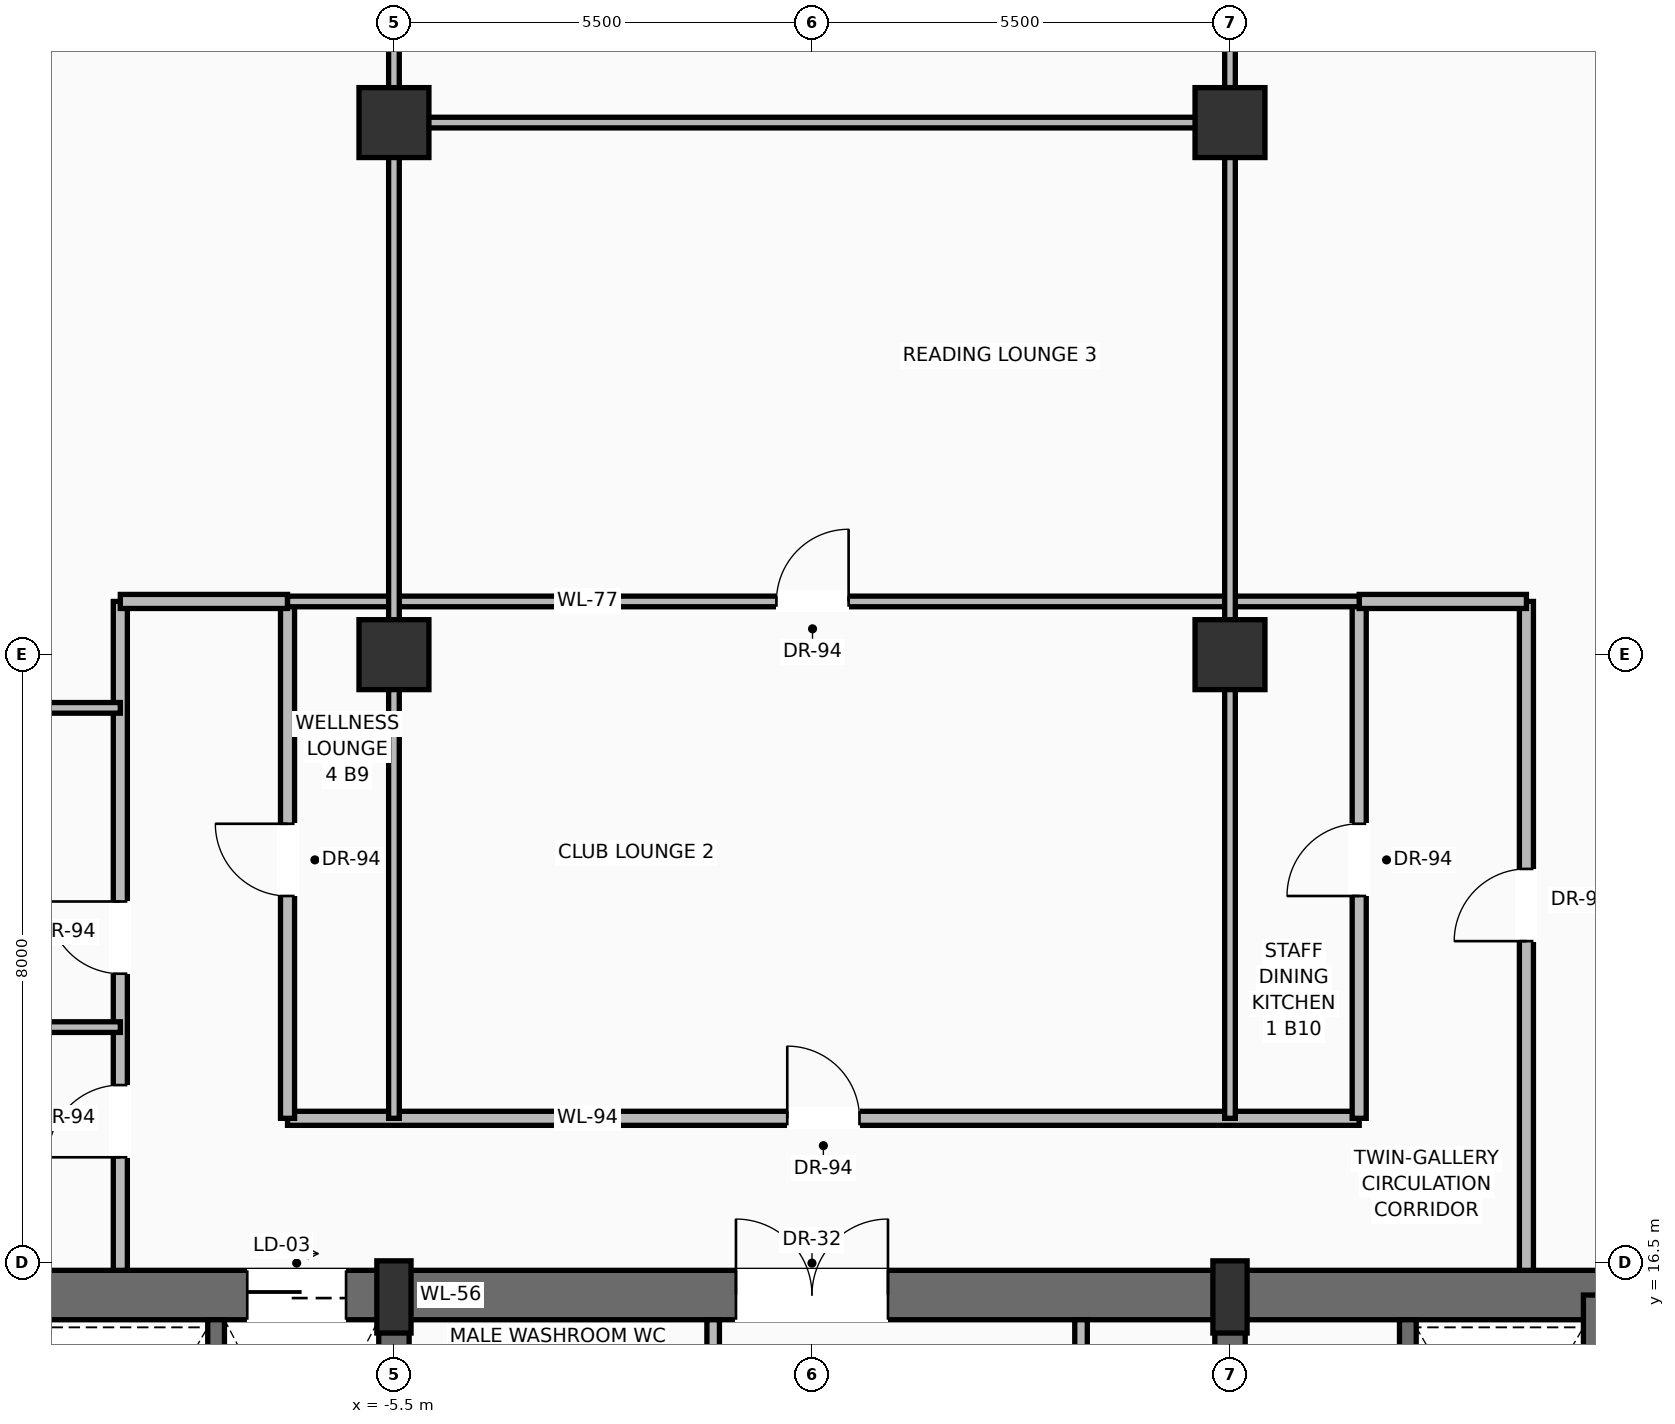
"""IFC4 building model, lengths in metres.
Left out: names, types, materials, properties, quantities, classifications, styles, units other than length and angle.
Written with IfcOpenShell. Run it as: python <this file> out.ifc"""

import sys

from ifc_helpers import new_model, si_unit, direction, frame, frame_2d, origin, origin_2d, place, context, subcontext, project, spatial, rectangle, extrude, source, transform, mapped, element, fill, save


model = new_model("IFC4")
c1 = context("Model", 3, precision=1e-05, world=origin(), true_north=direction((0.0, 1.0)))
c2 = subcontext(c1, "Body", "Model", "MODEL_VIEW")
j1 = project(units=[si_unit("LENGTHUNIT", "METRE"), si_unit("PLANEANGLEUNIT", "RADIAN")], contexts=[c1])
p1 = place(None, origin())
s1 = spatial("IfcSite", under=j1, at=p1, CompositionType="ELEMENT")
p2 = place(p1, origin())
s2 = spatial("IfcBuilding", under=s1, at=p2, CompositionType="ELEMENT")
p3 = place(p2, frame((0.0, 0.0, 147.8)))
s3 = spatial("IfcBuildingStorey", under=s2, at=p3, CompositionType="ELEMENT", Elevation=147.8)
p4 = place(p3, frame((-10.8, 16.075, 0.0), z_axis=(0.0, 0.0, 1.0), x_axis=(1.0, 0.0, 0.0)))
e1 = element("IfcWall", 1, at=p4, inside=s3, PredefinedType="SHEAR", context=c2, shape_type="SweptSolid", body=[
    extrude(rectangle(XDim=21.6, YDim=0.65, at=frame_2d((10.8, 0.0))), origin(), (0.0, 0.0, 1.0), 3.47),
])
p5 = place(p4, frame((3.37, 0.0, 0.0)))
e2 = element("IfcOpeningElement", 2, at=p5, cuts=e1, PredefinedType="OPENING", context=c2, shape_type="SweptSolid", body=[
    extrude(rectangle(XDim=1.3, YDim=2.3, at=frame_2d((0.65, 1.15))), frame((0.0, 0.335, 0.0), z_axis=(0.0, -1.0, 0.0), x_axis=(1.0, 0.0, 0.0)), (0.0, 0.0, 1.0), 0.67),
])
p6 = place(p4, frame((9.8, 0.0, 0.0)))
e3 = element("IfcOpeningElement", 3, at=p6, cuts=e1, PredefinedType="OPENING", context=c2, shape_type="SweptSolid", body=[
    extrude(rectangle(XDim=2.0, YDim=2.4, at=frame_2d((1.0, 1.2))), frame((0.0, 0.335, 0.0), z_axis=(0.0, -1.0, 0.0), x_axis=(1.0, 0.0, 0.0)), (0.0, 0.0, 1.0), 0.67),
])
p7 = place(p3, frame((10.475, 0.525, 0.0), z_axis=(0.0, 0.0, 1.0), x_axis=(0.0, 1.0, 0.0)))
e4 = element("IfcWall", 4, at=p7, inside=s3, PredefinedType="SHEAR", context=c2, shape_type="SweptSolid", body=[
    extrude(rectangle(XDim=15.55, YDim=0.65, at=frame_2d((7.775, 0.0))), origin(), (0.0, 0.0, 1.0), 3.47),
])
p8 = place(p3, frame((-5.5, 0.525, 0.0), z_axis=(0.0, 0.0, 1.0), x_axis=(0.0, 1.0, 0.0)))
e5 = element("IfcWall", 5, at=p8, inside=s3, PredefinedType="SHEAR", context=c2, shape_type="SweptSolid", body=[
    extrude(rectangle(XDim=15.55, YDim=0.4, at=frame_2d((7.775, 0.0))), origin(), (0.0, 0.0, 1.0), 3.47),
])
p9 = place(p8, frame((8.975, 0.0, 0.0)))
e6 = element("IfcOpeningElement", 6, at=p9, cuts=e5, PredefinedType="OPENING", context=c2, shape_type="SweptSolid", body=[
    extrude(rectangle(XDim=1.1, YDim=2.2, at=frame_2d((0.55, 1.1))), frame((0.0, 0.21, 0.0), z_axis=(0.0, -1.0, 0.0), x_axis=(1.0, 0.0, 0.0)), (0.0, 0.0, 1.0), 0.42),
])
p10 = place(p3, frame((5.5, 0.525, 0.0), z_axis=(0.0, 0.0, 1.0), x_axis=(0.0, 1.0, 0.0)))
e7 = element("IfcWall", 7, at=p10, inside=s3, PredefinedType="SHEAR", context=c2, shape_type="SweptSolid", body=[
    extrude(rectangle(XDim=15.55, YDim=0.4, at=frame_2d((7.775, 0.0))), origin(), (0.0, 0.0, 1.0), 3.47),
])
p11 = place(p10, frame((8.975, 0.0, 0.0)))
e8 = element("IfcOpeningElement", 8, at=p11, cuts=e7, PredefinedType="OPENING", context=c2, shape_type="SweptSolid", body=[
    extrude(rectangle(XDim=1.1, YDim=2.2, at=frame_2d((0.55, 1.1))), frame((0.0, 0.21, 0.0), z_axis=(0.0, -1.0, 0.0), x_axis=(1.0, 0.0, 0.0)), (0.0, 0.0, 1.0), 0.42),
])
m1 = source(origin(), c2, "Body", "SweptSolid", [
    extrude(rectangle(XDim=0.45, YDim=0.95, at=origin_2d()), origin(), (0.0, 0.0, 1.0), 3.7),
])
for number, where, z_axis, x_axis in (
    (9, (-5.5, 16.05, 0.0), (0.0, 0.0, 1.0), (1.0, 0.0, 0.0)),
    (10, (5.5, 16.05, 0.0), (0.0, 0.0, 1.0), (1.0, 0.0, 0.0)),
):
    element("IfcColumn", number, at=place(p3, frame(where, z_axis=z_axis, x_axis=x_axis)), inside=s3, PredefinedType="PILASTER", context=c2, shape_type="MappedRepresentation", body=[
        mapped(m1, transform((0.0, 0.0, 0.0), scale=1.0)),
    ])
m2 = source(origin(), c2, "Body", "SweptSolid", [
    extrude(rectangle(XDim=0.92, YDim=0.92, at=origin_2d()), origin(), (0.0, 0.0, 1.0), 3.7),
])
for number, where, z_axis, x_axis in (
    (11, (-5.5, 24.5, 0.0), (0.0, 0.0, 1.0), (1.0, 0.0, 0.0)),
    (12, (5.5, 24.5, 0.0), (0.0, 0.0, 1.0), (1.0, 0.0, 0.0)),
    (13, (-5.5, 31.5, 0.0), (0.0, 0.0, 1.0), (1.0, 0.0, 0.0)),
    (14, (5.5, 31.5, 0.0), (0.0, 0.0, 1.0), (1.0, 0.0, 0.0)),
):
    element("IfcColumn", number, at=place(p3, frame(where, z_axis=z_axis, x_axis=x_axis)), inside=s3, PredefinedType="COLUMN", context=c2, shape_type="MappedRepresentation", body=[
        mapped(m2, transform((0.0, 0.0, 0.0), scale=1.0)),
    ])
for number, where, z_axis, x_axis in (
    (15, (-7.84, 11.87, 0.0), (0.0, 0.0, 1.0), (0.0, 1.0, 0.0)),
    (16, (7.84, 11.87, 0.0), (0.0, 0.0, 1.0), (0.0, 1.0, 0.0)),
):
    element("IfcWall", number, at=place(p3, frame(where, z_axis=z_axis, x_axis=x_axis)), inside=s3, PredefinedType="SOLIDWALL", context=c2, shape_type="SweptSolid", body=[
        extrude(rectangle(XDim=3.88, YDim=0.22, at=frame_2d((1.94, 0.0))), origin(), (0.0, 0.0, 1.0), 3.47),
    ])
p12 = place(p3, frame((-1.3, 13.6, 0.0), z_axis=(0.0, 0.0, 1.0), x_axis=(0.0, 1.0, 0.0)))
e17 = element("IfcWall", 17, at=p12, inside=s3, PredefinedType="PARTITIONING", context=c2, shape_type="SweptSolid", body=[
    extrude(rectangle(XDim=2.15, YDim=0.165, at=frame_2d((1.075, 0.0))), origin(), (0.0, 0.0, 1.0), 3.462),
])
p13 = place(p12, frame((0.55, 0.0, 0.0)))
e18 = element("IfcOpeningElement", 18, at=p13, cuts=e17, PredefinedType="OPENING", context=c2, shape_type="SweptSolid", body=[
    extrude(rectangle(XDim=0.9, YDim=2.1, at=frame_2d((0.45, 1.05))), frame((0.0, 0.093, 0.0), z_axis=(0.0, -1.0, 0.0), x_axis=(1.0, 0.0, 0.0)), (0.0, 0.0, 1.0), 0.185),
])
p14 = place(p3, frame((3.54, 11.22, 0.0), z_axis=(0.0, 0.0, 1.0), x_axis=(0.0, 1.0, 0.0)))
e19 = element("IfcWall", 19, at=p14, inside=s3, PredefinedType="PARTITIONING", context=c2, shape_type="SweptSolid", body=[
    extrude(rectangle(XDim=4.53, YDim=0.165, at=frame_2d((2.265, 0.0))), origin(), (0.0, 0.0, 1.0), 3.462),
])
p15 = place(p14, frame((1.25, 0.0, 0.0)))
e20 = element("IfcOpeningElement", 20, at=p15, cuts=e19, PredefinedType="OPENING", context=c2, shape_type="SweptSolid", body=[
    extrude(rectangle(XDim=0.9, YDim=2.1, at=frame_2d((0.45, 1.05))), frame((0.0, 0.093, 0.0), z_axis=(0.0, -1.0, 0.0), x_axis=(1.0, 0.0, 0.0)), (0.0, 0.0, 1.0), 0.185),
])
p16 = place(p3, frame((-6.9, 18.4, 0.0), z_axis=(0.0, 0.0, 1.0), x_axis=(1.0, 0.0, 0.0)))
e21 = element("IfcWall", 21, at=p16, inside=s3, PredefinedType="PARTITIONING", context=c2, shape_type="SweptSolid", body=[
    extrude(rectangle(XDim=14.1, YDim=0.185, at=frame_2d((7.05, 0.0))), origin(), (0.0, 0.0, 1.0), 2.846),
])
p17 = place(p16, frame((6.575, 0.0, 0.0)))
e22 = element("IfcOpeningElement", 22, at=p17, cuts=e21, PredefinedType="OPENING", context=c2, shape_type="SweptSolid", body=[
    extrude(rectangle(XDim=0.95, YDim=2.2, at=frame_2d((0.475, 1.1))), frame((0.0, 0.103, 0.0), z_axis=(0.0, -1.0, 0.0), x_axis=(1.0, 0.0, 0.0)), (0.0, 0.0, 1.0), 0.205),
])
p18 = place(p3, frame((-6.9, 18.4, 0.0), z_axis=(0.0, 0.0, 1.0), x_axis=(0.0, 1.0, 0.0)))
e23 = element("IfcWall", 23, at=p18, inside=s3, PredefinedType="PARTITIONING", context=c2, shape_type="SweptSolid", body=[
    extrude(rectangle(XDim=6.8, YDim=0.185, at=frame_2d((3.4, 0.0))), origin(), (0.0, 0.0, 1.0), 2.846),
])
p19 = place(p18, frame((2.925, 0.0, 0.0)))
e24 = element("IfcOpeningElement", 24, at=p19, cuts=e23, PredefinedType="OPENING", context=c2, shape_type="SweptSolid", body=[
    extrude(rectangle(XDim=0.95, YDim=2.2, at=frame_2d((0.475, 1.1))), frame((0.0, 0.103, 0.0), z_axis=(0.0, -1.0, 0.0), x_axis=(1.0, 0.0, 0.0)), (0.0, 0.0, 1.0), 0.205),
])
p20 = place(p3, frame((7.2, 18.4, 0.0), z_axis=(0.0, 0.0, 1.0), x_axis=(0.0, 1.0, 0.0)))
e25 = element("IfcWall", 25, at=p20, inside=s3, PredefinedType="PARTITIONING", context=c2, shape_type="SweptSolid", body=[
    extrude(rectangle(XDim=6.8, YDim=0.185, at=frame_2d((3.4, 0.0))), origin(), (0.0, 0.0, 1.0), 2.846),
])
p21 = place(p20, frame((2.925, 0.0, 0.0)))
e26 = element("IfcOpeningElement", 26, at=p21, cuts=e25, PredefinedType="OPENING", context=c2, shape_type="SweptSolid", body=[
    extrude(rectangle(XDim=0.95, YDim=2.2, at=frame_2d((0.475, 1.1))), frame((0.0, 0.103, 0.0), z_axis=(0.0, -1.0, 0.0), x_axis=(1.0, 0.0, 0.0)), (0.0, 0.0, 1.0), 0.205),
])
p22 = place(p3, frame((-9.1, 16.4, 0.0), z_axis=(0.0, 0.0, 1.0), x_axis=(0.0, 1.0, 0.0)))
e27 = element("IfcWall", 27, at=p22, inside=s3, PredefinedType="PARTITIONING", context=c2, shape_type="SweptSolid", body=[
    extrude(rectangle(XDim=8.8, YDim=0.185, at=frame_2d((4.4, 0.0))), origin(), (0.0, 0.0, 1.0), 2.846),
])
p23 = place(p22, frame((3.903, 0.0, 0.0)))
e28 = element("IfcOpeningElement", 28, at=p23, cuts=e27, PredefinedType="OPENING", context=c2, shape_type="SweptSolid", body=[
    extrude(rectangle(XDim=0.95, YDim=2.2, at=frame_2d((0.475, 1.1))), frame((0.0, 0.103, 0.0), z_axis=(0.0, -1.0, 0.0), x_axis=(1.0, 0.0, 0.0)), (0.0, 0.0, 1.0), 0.205),
])
p24 = place(p22, frame((1.487, 0.0, 0.0)))
e29 = element("IfcOpeningElement", 29, at=p24, cuts=e27, PredefinedType="OPENING", context=c2, shape_type="SweptSolid", body=[
    extrude(rectangle(XDim=0.95, YDim=2.2, at=frame_2d((0.475, 1.1))), frame((0.0, 0.103, 0.0), z_axis=(0.0, -1.0, 0.0), x_axis=(1.0, 0.0, 0.0)), (0.0, 0.0, 1.0), 0.205),
])
p25 = place(p3, frame((9.4, 16.4, 0.0), z_axis=(0.0, 0.0, 1.0), x_axis=(0.0, 1.0, 0.0)))
e30 = element("IfcWall", 30, at=p25, inside=s3, PredefinedType="PARTITIONING", context=c2, shape_type="SweptSolid", body=[
    extrude(rectangle(XDim=8.8, YDim=0.185, at=frame_2d((4.4, 0.0))), origin(), (0.0, 0.0, 1.0), 2.846),
])
p26 = place(p25, frame((4.331, 0.0, 0.0)))
e31 = element("IfcOpeningElement", 31, at=p26, cuts=e30, PredefinedType="OPENING", context=c2, shape_type="SweptSolid", body=[
    extrude(rectangle(XDim=0.95, YDim=2.2, at=frame_2d((0.475, 1.1))), frame((0.0, 0.103, 0.0), z_axis=(0.0, -1.0, 0.0), x_axis=(1.0, 0.0, 0.0)), (0.0, 0.0, 1.0), 0.205),
])
p27 = place(p3, frame((-9.1, 25.2, 0.0), z_axis=(0.0, 0.0, 1.0), x_axis=(1.0, 0.0, 0.0)))
e32 = element("IfcWall", 32, at=p27, inside=s3, PredefinedType="PARTITIONING", context=c2, shape_type="SweptSolid", body=[
    extrude(rectangle(XDim=2.2, YDim=0.185, at=frame_2d((1.1, 0.0))), origin(), (0.0, 0.0, 1.0), 3.462),
])
p28 = place(p3, frame((7.2, 25.2, 0.0), z_axis=(0.0, 0.0, 1.0), x_axis=(1.0, 0.0, 0.0)))
e33 = element("IfcWall", 33, at=p28, inside=s3, PredefinedType="PARTITIONING", context=c2, shape_type="SweptSolid", body=[
    extrude(rectangle(XDim=2.2, YDim=0.185, at=frame_2d((1.1, 0.0))), origin(), (0.0, 0.0, 1.0), 3.462),
])
p29 = place(p3, frame((-6.9, 25.2, 0.0), z_axis=(0.0, 0.0, 1.0), x_axis=(1.0, 0.0, 0.0)))
e34 = element("IfcWall", 34, at=p29, inside=s3, PredefinedType="PARTITIONING", context=c2, shape_type="SweptSolid", body=[
    extrude(rectangle(XDim=14.1, YDim=0.14, at=frame_2d((7.05, 0.0))), origin(), (0.0, 0.0, 1.0), 3.462),
])
p30 = place(p29, frame((6.432, 0.0, 0.0)))
e35 = element("IfcOpeningElement", 35, at=p30, cuts=e34, PredefinedType="OPENING", context=c2, shape_type="SweptSolid", body=[
    extrude(rectangle(XDim=0.95, YDim=2.2, at=frame_2d((0.475, 1.1))), frame((0.0, 0.08, 0.0), z_axis=(0.0, -1.0, 0.0), x_axis=(1.0, 0.0, 0.0)), (0.0, 0.0, 1.0), 0.16),
])
for number, where, z_axis, x_axis in (
    (36, (-5.5, 18.4, 0.0), (0.0, 0.0, 1.0), (0.0, 1.0, 0.0)),
    (37, (5.5, 18.4, 0.0), (0.0, 0.0, 1.0), (0.0, 1.0, 0.0)),
):
    element("IfcWall", number, at=place(p3, frame(where, z_axis=z_axis, x_axis=x_axis)), inside=s3, PredefinedType="PARTITIONING", context=c2, shape_type="SweptSolid", body=[
        extrude(rectangle(XDim=14.1, YDim=0.14, at=frame_2d((7.05, 0.0))), origin(), (0.0, 0.0, 1.0), 2.846),
    ])
p31 = place(p3, frame((-5.5, 31.5, 0.0), z_axis=(0.0, 0.0, 1.0), x_axis=(1.0, 0.0, 0.0)))
e38 = element("IfcWall", 38, at=p31, inside=s3, PredefinedType="PARTITIONING", context=c2, shape_type="SweptSolid", body=[
    extrude(rectangle(XDim=11.0, YDim=0.14, at=frame_2d((5.5, 0.0))), origin(), (0.0, 0.0, 1.0), 2.846),
])
p32 = place(p3, frame((-19.378, 19.6, 0.0), z_axis=(0.0, 0.0, 1.0), x_axis=(1.0, 0.0, 0.0)))
e39 = element("IfcWall", 39, at=p32, inside=s3, PredefinedType="PARTITIONING", context=c2, shape_type="SweptSolid", body=[
    extrude(rectangle(XDim=10.278, YDim=0.14, at=frame_2d((5.139, 0.0))), origin(), (0.0, 0.0, 1.0), 3.049),
])
p33 = place(p3, frame((-16.665, 23.8, 0.0), z_axis=(0.0, 0.0, 1.0), x_axis=(1.0, 0.0, 0.0)))
e40 = element("IfcWall", 40, at=p33, inside=s3, PredefinedType="PARTITIONING", context=c2, shape_type="SweptSolid", body=[
    extrude(rectangle(XDim=7.565, YDim=0.14, at=frame_2d((3.782, 0.0))), origin(), (0.0, 0.0, 1.0), 3.462),
])
m3 = source(origin(), c2, "Body", "SweptSolid", [
    extrude(rectangle(XDim=1.3, YDim=2.3, at=frame_2d((0.65, 1.15))), frame((0.0, 0.025, 0.0), z_axis=(0.0, -1.0, 0.0), x_axis=(1.0, 0.0, 0.0)), (0.0, 0.0, 1.0), 0.05),
])
p34 = place(p5, origin())
e41 = element("IfcDoor", 41, at=p34, inside=s3, OperationType="SLIDING_TO_RIGHT", PredefinedType="DOOR", context=c2, shape_type="MappedRepresentation", body=[
    mapped(m3, transform((0.0, 0.0, 0.0), scale=1.0)),
])
fill(e2, e41)
m4 = source(origin(), c2, "Body", "SweptSolid", [
    extrude(rectangle(XDim=2.0, YDim=2.4, at=frame_2d((1.0, 1.2))), frame((0.0, 0.025, 0.0), z_axis=(0.0, -1.0, 0.0), x_axis=(1.0, 0.0, 0.0)), (0.0, 0.0, 1.0), 0.05),
])
p35 = place(p6, origin())
e42 = element("IfcDoor", 42, at=p35, inside=s3, OperationType="DOUBLE_DOOR_SINGLE_SWING", PredefinedType="DOOR", context=c2, shape_type="MappedRepresentation", body=[
    mapped(m4, transform((0.0, 0.0, 0.0), scale=1.0)),
])
fill(e3, e42)
m5 = source(origin(), c2, "Body", "SweptSolid", [
    extrude(rectangle(XDim=0.95, YDim=2.2, at=frame_2d((0.475, 1.1))), frame((0.0, 0.025, 0.0), z_axis=(0.0, -1.0, 0.0), x_axis=(1.0, 0.0, 0.0)), (0.0, 0.0, 1.0), 0.05),
])
p36 = place(p17, origin())
e43 = element("IfcDoor", 43, at=p36, inside=s3, OperationType="SINGLE_SWING_LEFT", PredefinedType="DOOR", context=c2, shape_type="MappedRepresentation", body=[
    mapped(m5, transform((0.0, 0.0, 0.0), scale=1.0)),
])
fill(e22, e43)
p37 = place(p23, origin())
e44 = element("IfcDoor", 44, at=p37, inside=s3, OperationType="SINGLE_SWING_RIGHT", PredefinedType="DOOR", context=c2, shape_type="MappedRepresentation", body=[
    mapped(m5, transform((0.0, 0.0, 0.0), scale=1.0)),
])
fill(e28, e44)
p38 = place(p26, origin())
e45 = element("IfcDoor", 45, at=p38, inside=s3, OperationType="SINGLE_SWING_LEFT", PredefinedType="DOOR", context=c2, shape_type="MappedRepresentation", body=[
    mapped(m5, transform((0.0, 0.0, 0.0), scale=1.0)),
])
fill(e31, e45)
p39 = place(p24, origin())
e46 = element("IfcDoor", 46, at=p39, inside=s3, OperationType="SINGLE_SWING_LEFT", PredefinedType="DOOR", context=c2, shape_type="MappedRepresentation", body=[
    mapped(m5, transform((0.0, 0.0, 0.0), scale=1.0)),
])
fill(e29, e46)
p40 = place(p19, origin())
e47 = element("IfcDoor", 47, at=p40, inside=s3, OperationType="SINGLE_SWING_RIGHT", PredefinedType="DOOR", context=c2, shape_type="MappedRepresentation", body=[
    mapped(m5, transform((0.0, 0.0, 0.0), scale=1.0)),
])
fill(e24, e47)
p41 = place(p21, origin())
e48 = element("IfcDoor", 48, at=p41, inside=s3, OperationType="SINGLE_SWING_LEFT", PredefinedType="DOOR", context=c2, shape_type="MappedRepresentation", body=[
    mapped(m5, transform((0.0, 0.0, 0.0), scale=1.0)),
])
fill(e26, e48)
p42 = place(p30, origin())
e49 = element("IfcDoor", 49, at=p42, inside=s3, OperationType="SINGLE_SWING_RIGHT", PredefinedType="DOOR", context=c2, shape_type="MappedRepresentation", body=[
    mapped(m5, transform((0.0, 0.0, 0.0), scale=1.0)),
])
fill(e35, e49)
save(model, sys.argv[1])
